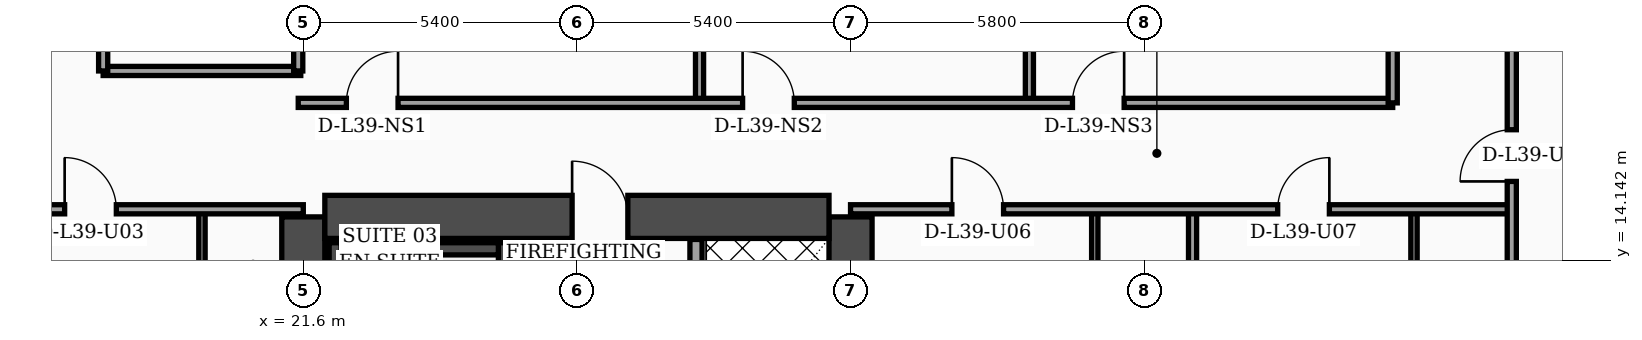
"""IFC4 building model, lengths in metres.
Left out: names, types, materials, properties, quantities, classifications, styles, units other than length and angle.
Written with IfcOpenShell. Run it as: python <this file> out.ifc"""

import sys

from ifc_helpers import new_model, si_unit, direction, frame, frame_2d, origin, place, context, subcontext, project, spatial, rectangle, extrude, element, fill, save


model = new_model("IFC4")
c1 = context("Model", 3, precision=1e-05, world=origin(), true_north=direction((0.0, 1.0)))
c2 = subcontext(c1, "Body", "Model", "MODEL_VIEW")
j1 = project(units=[si_unit("LENGTHUNIT", "METRE"), si_unit("PLANEANGLEUNIT", "RADIAN")], contexts=[c1])
p1 = place(None, origin())
s1 = spatial("IfcSite", under=j1, at=p1, CompositionType="ELEMENT")
p2 = place(p1, origin())
s2 = spatial("IfcBuilding", under=s1, at=p2, CompositionType="ELEMENT")
p3 = place(p2, frame((0.0, 0.0, 159.9)))
s3 = spatial("IfcBuildingStorey", under=s2, at=p3, CompositionType="ELEMENT", Elevation=159.9)
for number, where, z_axis, x_axis in (
    (1, (21.6, 4.6, 0.0), (0.0, 0.0, 1.0), (0.0, 1.0, 0.0)),
    (2, (32.4, 4.6, 0.0), (0.0, 0.0, 1.0), (0.0, 1.0, 0.0)),
):
    element("IfcWall", number, at=place(p3, frame(where, z_axis=z_axis, x_axis=x_axis)), inside=s3, PredefinedType="SHEAR", context=c2, shape_type="SweptSolid", body=[
        extrude(rectangle(XDim=10.4, YDim=0.85, at=frame_2d((5.2, 0.0))), origin(), (0.0, 0.0, 1.0), 3.56),
    ])
p4 = place(p3, frame((22.025, 15.0, 0.0), z_axis=(0.0, 0.0, 1.0), x_axis=(1.0, 0.0, 0.0)))
e3 = element("IfcWall", 3, at=p4, inside=s3, PredefinedType="SHEAR", context=c2, shape_type="SweptSolid", body=[
    extrude(rectangle(XDim=9.95, YDim=0.85, at=frame_2d((4.975, 0.0))), origin(), (0.0, 0.0, 1.0), 3.56),
])
p5 = place(p4, frame((4.88, 0.0, 0.0)))
e4 = element("IfcOpeningElement", 4, at=p5, cuts=e3, PredefinedType="OPENING", context=c2, shape_type="SweptSolid", body=[
    extrude(rectangle(XDim=1.1, YDim=2.2, at=frame_2d((0.55, 1.1))), frame((0.0, 0.435, 0.0), z_axis=(0.0, -1.0, 0.0), x_axis=(1.0, 0.0, 0.0)), (0.0, 0.0, 1.0), 0.87),
])
p6 = place(p3, frame((22.23, 5.025, 0.0), z_axis=(0.0, 0.0, 1.0), x_axis=(0.0, 1.0, 0.0)))
e5 = element("IfcWall", 5, at=p6, inside=s3, PredefinedType="SOLIDWALL", context=c2, shape_type="SweptSolid", body=[
    extrude(rectangle(XDim=9.465, YDim=0.24, at=frame_2d((4.732, 0.0))), origin(), (0.0, 0.0, 1.0), 3.56),
])
p7 = place(p3, frame((25.57, 5.025, 0.0), z_axis=(0.0, 0.0, 1.0), x_axis=(0.0, 1.0, 0.0)))
e6 = element("IfcWall", 6, at=p7, inside=s3, PredefinedType="SOLIDWALL", context=c2, shape_type="SweptSolid", body=[
    extrude(rectangle(XDim=9.465, YDim=0.24, at=frame_2d((4.732, 0.0))), origin(), (0.0, 0.0, 1.0), 3.56),
])
p8 = place(p7, frame((0.35, 0.0, 0.0)))
e7 = element("IfcOpeningElement", 7, at=p8, cuts=e6, PredefinedType="OPENING", context=c2, shape_type="SweptSolid", body=[
    extrude(rectangle(XDim=1.15, YDim=2.2, at=frame_2d((0.575, 1.1))), frame((0.0, 0.13, 0.0), z_axis=(0.0, -1.0, 0.0), x_axis=(1.0, 0.0, 0.0)), (0.0, 0.0, 1.0), 0.26),
])
p9 = place(p3, frame((22.35, 14.37, 0.0), z_axis=(0.0, 0.0, 1.0), x_axis=(1.0, 0.0, 0.0)))
e8 = element("IfcWall", 8, at=p9, inside=s3, PredefinedType="SOLIDWALL", context=c2, shape_type="SweptSolid", body=[
    extrude(rectangle(XDim=3.1, YDim=0.24, at=frame_2d((1.55, 0.0))), origin(), (0.0, 0.0, 1.0), 3.56),
])
p10 = place(p3, frame((29.35, 5.045, 0.0), z_axis=(0.0, 0.0, 1.0), x_axis=(0.0, 1.0, 0.0)))
e9 = element("IfcWall", 9, at=p10, inside=s3, PredefinedType="SOLIDWALL", context=c2, shape_type="SweptSolid", body=[
    extrude(rectangle(XDim=9.51, YDim=0.24, at=frame_2d((4.755, 0.0))), origin(), (0.0, 0.0, 1.0), 3.56),
])
p11 = place(p10, frame((0.55, 0.0, 0.0)))
e10 = element("IfcOpeningElement", 10, at=p11, cuts=e9, PredefinedType="OPENING", context=c2, shape_type="SweptSolid", body=[
    extrude(rectangle(XDim=1.3, YDim=2.35, at=frame_2d((0.65, 1.175))), frame((0.0, 0.13, 0.0), z_axis=(0.0, -1.0, 0.0), x_axis=(1.0, 0.0, 0.0)), (0.0, 0.0, 1.0), 0.26),
])
p12 = place(p3, frame((19.6, 2.44, 0.0), z_axis=(0.0, 0.0, 1.0), x_axis=(0.0, 1.0, 0.0)))
e11 = element("IfcWall", 11, at=p12, inside=s3, PredefinedType="PARTITIONING", context=c2, shape_type="SweptSolid", body=[
    extrude(rectangle(XDim=12.71, YDim=0.125, at=frame_2d((6.355, 0.0))), origin(), (0.0, 0.0, 1.0), 2.49),
])
p13 = place(p12, frame((4.34, 0.0, 0.0)))
e12 = element("IfcOpeningElement", 12, at=p13, cuts=e11, PredefinedType="OPENING", context=c2, shape_type="SweptSolid", body=[
    extrude(rectangle(XDim=0.96, YDim=2.2, at=frame_2d((0.48, 1.1))), frame((0.0, 0.073, 0.0), z_axis=(0.0, -1.0, 0.0), x_axis=(1.0, 0.0, 0.0)), (0.0, 0.0, 1.0), 0.145),
])
p14 = place(p12, frame((10.18, 0.0, 0.0)))
e13 = element("IfcOpeningElement", 13, at=p14, cuts=e11, PredefinedType="OPENING", context=c2, shape_type="SweptSolid", body=[
    extrude(rectangle(XDim=0.9, YDim=2.15, at=frame_2d((0.45, 1.075))), frame((0.0, 0.073, 0.0), z_axis=(0.0, -1.0, 0.0), x_axis=(1.0, 0.0, 0.0)), (0.0, 0.0, 1.0), 0.145),
])
p15 = place(p3, frame((15.15, 15.15, 0.0), z_axis=(0.0, 0.0, 1.0), x_axis=(1.0, 0.0, 0.0)))
e14 = element("IfcWall", 14, at=p15, inside=s3, PredefinedType="PARTITIONING", context=c2, shape_type="SweptSolid", body=[
    extrude(rectangle(XDim=6.45, YDim=0.18, at=frame_2d((3.225, 0.0))), origin(), (0.0, 0.0, 1.0), 2.49),
])
p16 = place(p15, frame((1.74, 0.0, 0.0)))
e15 = element("IfcOpeningElement", 15, at=p16, cuts=e14, PredefinedType="OPENING", context=c2, shape_type="SweptSolid", body=[
    extrude(rectangle(XDim=1.02, YDim=2.2, at=frame_2d((0.51, 1.1))), frame((0.0, 0.1, 0.0), z_axis=(0.0, -1.0, 0.0), x_axis=(1.0, 0.0, 0.0)), (0.0, 0.0, 1.0), 0.2),
])
p17 = place(p3, frame((17.65, 17.88, 0.0), z_axis=(0.0, 0.0, 1.0), x_axis=(1.0, 0.0, 0.0)))
e16 = element("IfcWall", 16, at=p17, inside=s3, PredefinedType="PARTITIONING", context=c2, shape_type="SweptSolid", body=[
    extrude(rectangle(XDim=3.9, YDim=0.18, at=frame_2d((1.95, 0.0))), origin(), (0.0, 0.0, 1.0), 3.56),
])
p18 = place(p3, frame((21.5, 17.88, 0.0), z_axis=(0.0, 0.0, 1.0), x_axis=(0.0, 1.0, 0.0)))
e17 = element("IfcWall", 17, at=p18, inside=s3, PredefinedType="PARTITIONING", context=c2, shape_type="SweptSolid", body=[
    extrude(rectangle(XDim=6.44, YDim=0.18, at=frame_2d((3.22, 0.0))), origin(), (0.0, 0.0, 1.0), 3.09),
])
p19 = place(p3, frame((17.65, 17.88, 0.0), z_axis=(0.0, 0.0, 1.0), x_axis=(0.0, 1.0, 0.0)))
e18 = element("IfcWall", 18, at=p19, inside=s3, PredefinedType="PARTITIONING", context=c2, shape_type="SweptSolid", body=[
    extrude(rectangle(XDim=6.44, YDim=0.18, at=frame_2d((3.22, 0.0))), origin(), (0.0, 0.0, 1.0), 3.09),
])
p20 = place(p19, frame((0.65, 0.0, 0.0)))
e19 = element("IfcOpeningElement", 19, at=p20, cuts=e18, PredefinedType="OPENING", context=c2, shape_type="SweptSolid", body=[
    extrude(rectangle(XDim=0.98, YDim=2.15, at=frame_2d((0.49, 1.075))), frame((0.0, 0.1, 0.0), z_axis=(0.0, -1.0, 0.0), x_axis=(1.0, 0.0, 0.0)), (0.0, 0.0, 1.0), 0.2),
])
p21 = place(p19, frame((3.97, 0.0, 0.0)))
e20 = element("IfcOpeningElement", 20, at=p21, cuts=e18, PredefinedType="OPENING", context=c2, shape_type="SweptSolid", body=[
    extrude(rectangle(XDim=0.96, YDim=2.2, at=frame_2d((0.48, 1.1))), frame((0.0, 0.1, 0.0), z_axis=(0.0, -1.0, 0.0), x_axis=(1.0, 0.0, 0.0)), (0.0, 0.0, 1.0), 0.2),
])
p22 = place(p3, frame((37.22, 2.44, 0.0), z_axis=(0.0, 0.0, 1.0), x_axis=(0.0, 1.0, 0.0)))
e21 = element("IfcWall", 21, at=p22, inside=s3, PredefinedType="PARTITIONING", context=c2, shape_type="SweptSolid", body=[
    extrude(rectangle(XDim=12.71, YDim=0.125, at=frame_2d((6.355, 0.0))), origin(), (0.0, 0.0, 1.0), 2.94),
])
p23 = place(p22, frame((4.35, 0.0, 0.0)))
e22 = element("IfcOpeningElement", 22, at=p23, cuts=e21, PredefinedType="OPENING", context=c2, shape_type="SweptSolid", body=[
    extrude(rectangle(XDim=0.96, YDim=2.2, at=frame_2d((0.48, 1.1))), frame((0.0, 0.073, 0.0), z_axis=(0.0, -1.0, 0.0), x_axis=(1.0, 0.0, 0.0)), (0.0, 0.0, 1.0), 0.145),
])
p24 = place(p22, frame((10.21, 0.0, 0.0)))
e23 = element("IfcOpeningElement", 23, at=p24, cuts=e21, PredefinedType="OPENING", context=c2, shape_type="SweptSolid", body=[
    extrude(rectangle(XDim=0.9, YDim=2.15, at=frame_2d((0.45, 1.075))), frame((0.0, 0.073, 0.0), z_axis=(0.0, -1.0, 0.0), x_axis=(1.0, 0.0, 0.0)), (0.0, 0.0, 1.0), 0.145),
])
p25 = place(p3, frame((43.52, 2.44, 0.0), z_axis=(0.0, 0.0, 1.0), x_axis=(0.0, 1.0, 0.0)))
e24 = element("IfcWall", 24, at=p25, inside=s3, PredefinedType="PARTITIONING", context=c2, shape_type="SweptSolid", body=[
    extrude(rectangle(XDim=12.71, YDim=0.125, at=frame_2d((6.355, 0.0))), origin(), (0.0, 0.0, 1.0), 3.04),
])
p26 = place(p25, frame((4.35, 0.0, 0.0)))
e25 = element("IfcOpeningElement", 25, at=p26, cuts=e24, PredefinedType="OPENING", context=c2, shape_type="SweptSolid", body=[
    extrude(rectangle(XDim=0.96, YDim=2.2, at=frame_2d((0.48, 1.1))), frame((0.0, 0.073, 0.0), z_axis=(0.0, -1.0, 0.0), x_axis=(1.0, 0.0, 0.0)), (0.0, 0.0, 1.0), 0.145),
])
p27 = place(p25, frame((10.21, 0.0, 0.0)))
e26 = element("IfcOpeningElement", 26, at=p27, cuts=e24, PredefinedType="OPENING", context=c2, shape_type="SweptSolid", body=[
    extrude(rectangle(XDim=0.9, YDim=2.15, at=frame_2d((0.45, 1.075))), frame((0.0, 0.073, 0.0), z_axis=(0.0, -1.0, 0.0), x_axis=(1.0, 0.0, 0.0)), (0.0, 0.0, 1.0), 0.145),
])
p28 = place(p3, frame((39.15, 2.44, 0.0), z_axis=(0.0, 0.0, 1.0), x_axis=(0.0, 1.0, 0.0)))
e27 = element("IfcWall", 27, at=p28, inside=s3, PredefinedType="PARTITIONING", context=c2, shape_type="SweptSolid", body=[
    extrude(rectangle(XDim=12.71, YDim=0.16, at=frame_2d((6.355, 0.0))), origin(), (0.0, 0.0, 1.0), 2.94),
])
p29 = place(p3, frame((32.4, 15.15, 0.0), z_axis=(0.0, 0.0, 1.0), x_axis=(1.0, 0.0, 0.0)))
e28 = element("IfcWall", 28, at=p29, inside=s3, PredefinedType="PARTITIONING", context=c2, shape_type="SweptSolid", body=[
    extrude(rectangle(XDim=13.05, YDim=0.18, at=frame_2d((6.525, 0.0))), origin(), (0.0, 0.0, 1.0), 2.94),
])
p30 = place(p29, frame((2.0, 0.0, 0.0)))
e29 = element("IfcOpeningElement", 29, at=p30, cuts=e28, PredefinedType="OPENING", context=c2, shape_type="SweptSolid", body=[
    extrude(rectangle(XDim=1.02, YDim=2.2, at=frame_2d((0.51, 1.1))), frame((0.0, 0.1, 0.0), z_axis=(0.0, -1.0, 0.0), x_axis=(1.0, 0.0, 0.0)), (0.0, 0.0, 1.0), 0.2),
])
p31 = place(p29, frame((8.43, 0.0, 0.0)))
e30 = element("IfcOpeningElement", 30, at=p31, cuts=e28, PredefinedType="OPENING", context=c2, shape_type="SweptSolid", body=[
    extrude(rectangle(XDim=1.02, YDim=2.2, at=frame_2d((0.51, 1.1))), frame((0.0, 0.1, 0.0), z_axis=(0.0, -1.0, 0.0), x_axis=(1.0, 0.0, 0.0)), (0.0, 0.0, 1.0), 0.2),
])
p32 = place(p3, frame((29.42, 17.25, 0.0), z_axis=(0.0, 0.0, 1.0), x_axis=(0.0, 1.0, 0.0)))
e31 = element("IfcWall", 31, at=p32, inside=s3, PredefinedType="PARTITIONING", context=c2, shape_type="SweptSolid", body=[
    extrude(rectangle(XDim=11.59, YDim=0.16, at=frame_2d((5.795, 0.0))), origin(), (0.0, 0.0, 1.0), 2.94),
])
p33 = place(p3, frame((35.93, 17.25, 0.0), z_axis=(0.0, 0.0, 1.0), x_axis=(0.0, 1.0, 0.0)))
e32 = element("IfcWall", 32, at=p33, inside=s3, PredefinedType="PARTITIONING", context=c2, shape_type="SweptSolid", body=[
    extrude(rectangle(XDim=15.22, YDim=0.16, at=frame_2d((7.61, 0.0))), origin(), (0.0, 0.0, 1.0), 2.94),
])
p34 = place(p3, frame((21.5, 17.25, 0.0), z_axis=(0.0, 0.0, 1.0), x_axis=(1.0, 0.0, 0.0)))
e33 = element("IfcWall", 33, at=p34, inside=s3, PredefinedType="PARTITIONING", context=c2, shape_type="SweptSolid", body=[
    extrude(rectangle(XDim=21.6, YDim=0.18, at=frame_2d((10.8, 0.0))), origin(), (0.0, 0.0, 1.0), 2.94),
])
p35 = place(p34, frame((0.95, 0.0, 0.0)))
e34 = element("IfcOpeningElement", 34, at=p35, cuts=e33, PredefinedType="OPENING", context=c2, shape_type="SweptSolid", body=[
    extrude(rectangle(XDim=1.02, YDim=2.2, at=frame_2d((0.51, 1.1))), frame((0.0, 0.1, 0.0), z_axis=(0.0, -1.0, 0.0), x_axis=(1.0, 0.0, 0.0)), (0.0, 0.0, 1.0), 0.2),
])
p36 = place(p34, frame((8.77, 0.0, 0.0)))
e35 = element("IfcOpeningElement", 35, at=p36, cuts=e33, PredefinedType="OPENING", context=c2, shape_type="SweptSolid", body=[
    extrude(rectangle(XDim=1.02, YDim=2.2, at=frame_2d((0.51, 1.1))), frame((0.0, 0.1, 0.0), z_axis=(0.0, -1.0, 0.0), x_axis=(1.0, 0.0, 0.0)), (0.0, 0.0, 1.0), 0.2),
])
p37 = place(p34, frame((15.28, 0.0, 0.0)))
e36 = element("IfcOpeningElement", 36, at=p37, cuts=e33, PredefinedType="OPENING", context=c2, shape_type="SweptSolid", body=[
    extrude(rectangle(XDim=1.02, YDim=2.2, at=frame_2d((0.51, 1.1))), frame((0.0, 0.1, 0.0), z_axis=(0.0, -1.0, 0.0), x_axis=(1.0, 0.0, 0.0)), (0.0, 0.0, 1.0), 0.2),
])
p38 = place(p3, frame((43.1, 17.25, 0.0), z_axis=(0.0, 0.0, 1.0), x_axis=(0.0, 1.0, 0.0)))
e37 = element("IfcWall", 37, at=p38, inside=s3, PredefinedType="PARTITIONING", context=c2, shape_type="SweptSolid", body=[
    extrude(rectangle(XDim=19.21, YDim=0.18, at=frame_2d((9.605, 0.0))), origin(), (0.0, 0.0, 1.0), 2.94),
])
p39 = place(p3, frame((45.45, 2.44, 0.0), z_axis=(0.0, 0.0, 1.0), x_axis=(0.0, 1.0, 0.0)))
e38 = element("IfcWall", 38, at=p39, inside=s3, PredefinedType="PARTITIONING", context=c2, shape_type="SweptSolid", body=[
    extrude(rectangle(XDim=27.84, YDim=0.18, at=frame_2d((13.92, 0.0))), origin(), (0.0, 0.0, 1.0), 2.94),
])
p40 = place(p39, frame((13.26, 0.0, 0.0)))
e39 = element("IfcOpeningElement", 39, at=p40, cuts=e38, PredefinedType="OPENING", context=c2, shape_type="SweptSolid", body=[
    extrude(rectangle(XDim=1.02, YDim=2.2, at=frame_2d((0.51, 1.1))), frame((0.0, 0.1, 0.0), z_axis=(0.0, -1.0, 0.0), x_axis=(1.0, 0.0, 0.0)), (0.0, 0.0, 1.0), 0.2),
])
p41 = place(p39, frame((21.52, 0.0, 0.0)))
e40 = element("IfcOpeningElement", 40, at=p41, cuts=e38, PredefinedType="OPENING", context=c2, shape_type="SweptSolid", body=[
    extrude(rectangle(XDim=1.02, YDim=2.2, at=frame_2d((0.51, 1.1))), frame((0.0, 0.1, 0.0), z_axis=(0.0, -1.0, 0.0), x_axis=(1.0, 0.0, 0.0)), (0.0, 0.0, 1.0), 0.2),
])
p42 = place(p16, origin())
e41 = element("IfcDoor", 41, at=p42, inside=s3, OperationType="SINGLE_SWING_LEFT", PredefinedType="DOOR", context=c2, shape_type="SweptSolid", body=[
    extrude(rectangle(XDim=1.02, YDim=2.2, at=frame_2d((0.51, 1.1))), frame((0.0, 0.025, 0.0), z_axis=(0.0, -1.0, 0.0), x_axis=(1.0, 0.0, 0.0)), (0.0, 0.0, 1.0), 0.05),
])
fill(e15, e41)
p43 = place(p30, origin())
e42 = element("IfcDoor", 42, at=p43, inside=s3, OperationType="SINGLE_SWING_LEFT", PredefinedType="DOOR", context=c2, shape_type="SweptSolid", body=[
    extrude(rectangle(XDim=1.02, YDim=2.2, at=frame_2d((0.51, 1.1))), frame((0.0, 0.025, 0.0), z_axis=(0.0, -1.0, 0.0), x_axis=(1.0, 0.0, 0.0)), (0.0, 0.0, 1.0), 0.05),
])
fill(e29, e42)
p44 = place(p31, origin())
e43 = element("IfcDoor", 43, at=p44, inside=s3, OperationType="SINGLE_SWING_RIGHT", PredefinedType="DOOR", context=c2, shape_type="SweptSolid", body=[
    extrude(rectangle(XDim=1.02, YDim=2.2, at=frame_2d((0.51, 1.1))), frame((0.0, 0.025, 0.0), z_axis=(0.0, -1.0, 0.0), x_axis=(1.0, 0.0, 0.0)), (0.0, 0.0, 1.0), 0.05),
])
fill(e30, e43)
p45 = place(p35, origin())
e44 = element("IfcDoor", 44, at=p45, inside=s3, OperationType="SINGLE_SWING_RIGHT", PredefinedType="DOOR", context=c2, shape_type="SweptSolid", body=[
    extrude(rectangle(XDim=1.02, YDim=2.2, at=frame_2d((0.51, 1.1))), frame((0.0, 0.025, 0.0), z_axis=(0.0, -1.0, 0.0), x_axis=(1.0, 0.0, 0.0)), (0.0, 0.0, 1.0), 0.05),
])
fill(e34, e44)
p46 = place(p36, origin())
e45 = element("IfcDoor", 45, at=p46, inside=s3, OperationType="SINGLE_SWING_LEFT", PredefinedType="DOOR", context=c2, shape_type="SweptSolid", body=[
    extrude(rectangle(XDim=1.02, YDim=2.2, at=frame_2d((0.51, 1.1))), frame((0.0, 0.025, 0.0), z_axis=(0.0, -1.0, 0.0), x_axis=(1.0, 0.0, 0.0)), (0.0, 0.0, 1.0), 0.05),
])
fill(e35, e45)
p47 = place(p37, origin())
e46 = element("IfcDoor", 46, at=p47, inside=s3, OperationType="SINGLE_SWING_RIGHT", PredefinedType="DOOR", context=c2, shape_type="SweptSolid", body=[
    extrude(rectangle(XDim=1.02, YDim=2.2, at=frame_2d((0.51, 1.1))), frame((0.0, 0.025, 0.0), z_axis=(0.0, -1.0, 0.0), x_axis=(1.0, 0.0, 0.0)), (0.0, 0.0, 1.0), 0.05),
])
fill(e36, e46)
p48 = place(p40, origin())
e47 = element("IfcDoor", 47, at=p48, inside=s3, OperationType="SINGLE_SWING_LEFT", PredefinedType="DOOR", context=c2, shape_type="SweptSolid", body=[
    extrude(rectangle(XDim=1.02, YDim=2.2, at=frame_2d((0.51, 1.1))), frame((0.0, 0.025, 0.0), z_axis=(0.0, -1.0, 0.0), x_axis=(1.0, 0.0, 0.0)), (0.0, 0.0, 1.0), 0.05),
])
fill(e39, e47)
p49 = place(p5, origin())
e48 = element("IfcDoor", 48, at=p49, inside=s3, OperationType="SINGLE_SWING_LEFT", PredefinedType="DOOR", context=c2, shape_type="SweptSolid", body=[
    extrude(rectangle(XDim=1.1, YDim=2.2, at=frame_2d((0.55, 1.1))), frame((0.0, 0.025, 0.0), z_axis=(0.0, -1.0, 0.0), x_axis=(1.0, 0.0, 0.0)), (0.0, 0.0, 1.0), 0.05),
])
fill(e4, e48)
save(model, sys.argv[1])
